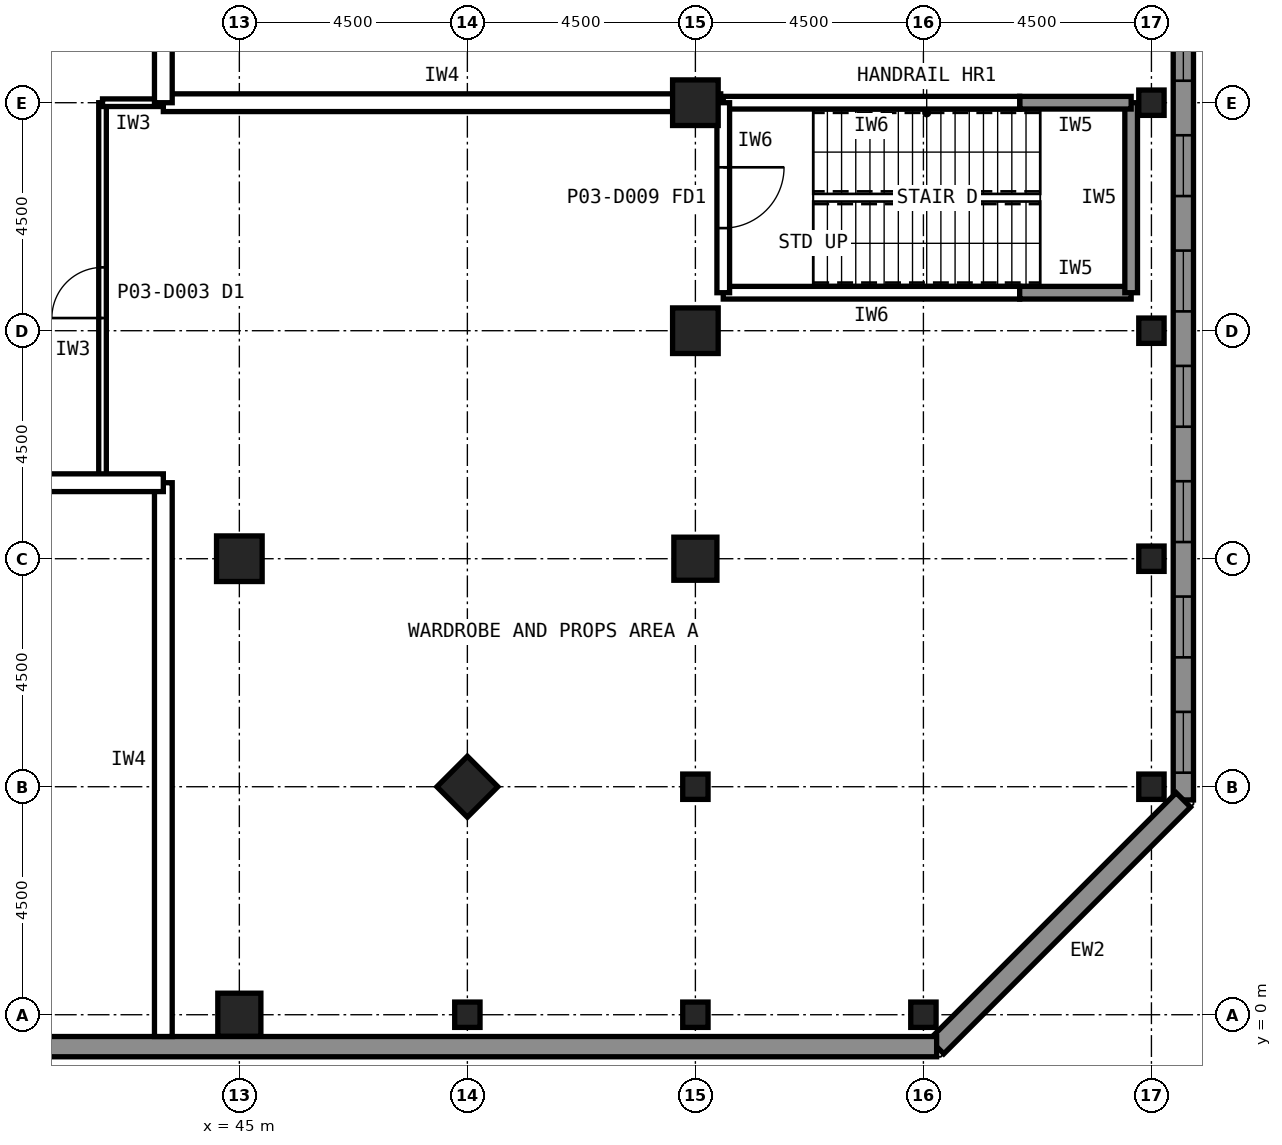
"""IFC4 building model, lengths in metres.
Left out: names, types, materials, properties, quantities, classifications, styles, units other than length and angle.
Written with IfcOpenShell. Run it as: python <this file> out.ifc"""

import sys

from ifc_helpers import new_model, si_unit, direction, frame, frame_2d, origin, origin_2d, place, context, subcontext, project, spatial, rectangle, hollow_rectangle, extrude, element, fill, save


model = new_model("IFC4")
c1 = context("Model", 3, precision=1e-05, world=origin(), true_north=direction((0.0, 1.0)))
c2 = subcontext(c1, "Body", "Model", "MODEL_VIEW")
j1 = project(units=[si_unit("LENGTHUNIT", "METRE"), si_unit("PLANEANGLEUNIT", "RADIAN")], contexts=[c1])
p1 = place(None, origin())
s1 = spatial("IfcSite", under=j1, at=p1, CompositionType="ELEMENT")
p2 = place(p1, origin())
s2 = spatial("IfcBuilding", under=s1, at=p2, CompositionType="ELEMENT")
p3 = place(p2, frame((0.0, 0.0, 12.0)))
s3 = spatial("IfcBuildingStorey", under=s2, at=p3, CompositionType="ELEMENT", Elevation=12.0)
for number, where, z_axis, x_axis in (
    (1, (45.0, 0.0, 0.0), (0.0, 0.0, 1.0), (1.0, 0.0, 0.0)),
    (2, (54.0, 9.0, 0.0), (0.0, 0.0, 1.0), (1.0, 0.0, 0.0)),
):
    element("IfcColumn", number, at=place(p3, frame(where, z_axis=z_axis, x_axis=x_axis)), inside=s3, PredefinedType="COLUMN", context=c2, shape_type="SweptSolid", body=[
        extrude(hollow_rectangle(XDim=0.85, YDim=0.85, WallThickness=0.05, at=origin_2d()), origin(), (0.0, 0.0, 1.0), 6.0),
    ])
for number, where, z_axis, x_axis in (
    (3, (54.0, 13.5, 0.0), (0.0, 0.0, 1.0), (1.0, 0.0, 0.0)),
    (4, (54.0, 18.0, 0.0), (0.0, 0.0, 1.0), (1.0, 0.0, 0.0)),
):
    element("IfcColumn", number, at=place(p3, frame(where, z_axis=z_axis, x_axis=x_axis)), inside=s3, PredefinedType="COLUMN", context=c2, shape_type="SweptSolid", body=[
        extrude(hollow_rectangle(XDim=0.9, YDim=0.9, WallThickness=0.063, at=origin_2d()), origin(), (0.0, 0.0, 1.0), 6.0),
    ])
p4 = place(p3, frame((49.5, 4.5, 0.0), z_axis=(0.0, 0.0, 1.0), x_axis=(0.707106781187, 0.707106781187, 0.0)))
e5 = element("IfcColumn", 5, at=p4, inside=s3, PredefinedType="COLUMN", context=c2, shape_type="SweptSolid", body=[
    extrude(hollow_rectangle(XDim=0.85, YDim=0.85, WallThickness=0.05, at=origin_2d()), origin(), (0.0, 0.0, 1.0), 6.0),
])
p5 = place(p3, frame((45.0, 9.0, 0.0), z_axis=(0.0, 0.0, 1.0), x_axis=(1.0, 0.0, 0.0)))
e6 = element("IfcColumn", 6, at=p5, inside=s3, PredefinedType="COLUMN", context=c2, shape_type="SweptSolid", body=[
    extrude(hollow_rectangle(XDim=0.9, YDim=0.9, WallThickness=0.063, at=origin_2d()), origin(), (0.0, 0.0, 1.0), 6.0),
])
for number, where, z_axis, x_axis in (
    (7, (63.0, 4.5, 0.0), (0.0, 0.0, 1.0), (1.0, 0.0, 0.0)),
    (8, (63.0, 9.0, 0.0), (0.0, 0.0, 1.0), (1.0, 0.0, 0.0)),
    (9, (63.0, 13.5, 0.0), (0.0, 0.0, 1.0), (1.0, 0.0, 0.0)),
    (10, (63.0, 18.0, 0.0), (0.0, 0.0, 1.0), (1.0, 0.0, 0.0)),
    (11, (58.5, 0.0, 0.0), (0.0, 0.0, 1.0), (1.0, 0.0, 0.0)),
    (12, (54.0, 0.0, 0.0), (0.0, 0.0, 1.0), (1.0, 0.0, 0.0)),
    (13, (49.5, 0.0, 0.0), (0.0, 0.0, 1.0), (1.0, 0.0, 0.0)),
    (14, (54.0, 4.5, 0.0), (0.0, 0.0, 1.0), (1.0, 0.0, 0.0)),
):
    element("IfcColumn", number, at=place(p3, frame(where, z_axis=z_axis, x_axis=x_axis)), inside=s3, PredefinedType="COLUMN", context=c2, shape_type="SweptSolid", body=[
        extrude(hollow_rectangle(XDim=0.5, YDim=0.5, WallThickness=0.022, at=origin_2d()), origin(), (0.0, 0.0, 1.0), 6.0),
    ])
p6 = place(p3, frame((63.63, 49.761, 0.0), z_axis=(0.0, 0.0, 1.0), x_axis=(0.0, -1.0, 0.0)))
e15 = element("IfcWall", 15, at=p6, inside=s3, PredefinedType="SOLIDWALL", context=c2, shape_type="SweptSolid", body=[
    extrude(rectangle(XDim=45.522, YDim=0.4, at=frame_2d((22.761, 0.0))), origin(), (0.0, 0.0, 1.0), 6.0),
])
p7 = place(p6, frame((0.538, 0.0, 0.9)))
e16 = element("IfcOpeningElement", 16, at=p7, cuts=e15, PredefinedType="OPENING", context=c2, shape_type="SweptSolid", body=[
    extrude(rectangle(XDim=1.2, YDim=1.5, at=frame_2d((0.6, 0.75))), frame((0.0, 0.21, 0.0), z_axis=(0.0, -1.0, 0.0), x_axis=(1.0, 0.0, 0.0)), (0.0, 0.0, 1.0), 0.42),
])
p8 = place(p6, frame((2.814, 0.0, 0.9)))
e17 = element("IfcOpeningElement", 17, at=p8, cuts=e15, PredefinedType="OPENING", context=c2, shape_type="SweptSolid", body=[
    extrude(rectangle(XDim=1.2, YDim=1.5, at=frame_2d((0.6, 0.75))), frame((0.0, 0.21, 0.0), z_axis=(0.0, -1.0, 0.0), x_axis=(1.0, 0.0, 0.0)), (0.0, 0.0, 1.0), 0.42),
])
p9 = place(p6, frame((5.09, 0.0, 0.9)))
e18 = element("IfcOpeningElement", 18, at=p9, cuts=e15, PredefinedType="OPENING", context=c2, shape_type="SweptSolid", body=[
    extrude(rectangle(XDim=1.2, YDim=1.5, at=frame_2d((0.6, 0.75))), frame((0.0, 0.21, 0.0), z_axis=(0.0, -1.0, 0.0), x_axis=(1.0, 0.0, 0.0)), (0.0, 0.0, 1.0), 0.42),
])
p10 = place(p6, frame((7.366, 0.0, 0.9)))
e19 = element("IfcOpeningElement", 19, at=p10, cuts=e15, PredefinedType="OPENING", context=c2, shape_type="SweptSolid", body=[
    extrude(rectangle(XDim=1.2, YDim=1.5, at=frame_2d((0.6, 0.75))), frame((0.0, 0.21, 0.0), z_axis=(0.0, -1.0, 0.0), x_axis=(1.0, 0.0, 0.0)), (0.0, 0.0, 1.0), 0.42),
])
p11 = place(p6, frame((9.642, 0.0, 0.9)))
e20 = element("IfcOpeningElement", 20, at=p11, cuts=e15, PredefinedType="OPENING", context=c2, shape_type="SweptSolid", body=[
    extrude(rectangle(XDim=1.2, YDim=1.5, at=frame_2d((0.6, 0.75))), frame((0.0, 0.21, 0.0), z_axis=(0.0, -1.0, 0.0), x_axis=(1.0, 0.0, 0.0)), (0.0, 0.0, 1.0), 0.42),
])
p12 = place(p6, frame((11.918, 0.0, 0.9)))
e21 = element("IfcOpeningElement", 21, at=p12, cuts=e15, PredefinedType="OPENING", context=c2, shape_type="SweptSolid", body=[
    extrude(rectangle(XDim=1.2, YDim=1.5, at=frame_2d((0.6, 0.75))), frame((0.0, 0.21, 0.0), z_axis=(0.0, -1.0, 0.0), x_axis=(1.0, 0.0, 0.0)), (0.0, 0.0, 1.0), 0.42),
])
p13 = place(p6, frame((14.195, 0.0, 0.9)))
e22 = element("IfcOpeningElement", 22, at=p13, cuts=e15, PredefinedType="OPENING", context=c2, shape_type="SweptSolid", body=[
    extrude(rectangle(XDim=1.2, YDim=1.5, at=frame_2d((0.6, 0.75))), frame((0.0, 0.21, 0.0), z_axis=(0.0, -1.0, 0.0), x_axis=(1.0, 0.0, 0.0)), (0.0, 0.0, 1.0), 0.42),
])
p14 = place(p6, frame((16.471, 0.0, 0.9)))
e23 = element("IfcOpeningElement", 23, at=p14, cuts=e15, PredefinedType="OPENING", context=c2, shape_type="SweptSolid", body=[
    extrude(rectangle(XDim=1.2, YDim=1.5, at=frame_2d((0.6, 0.75))), frame((0.0, 0.21, 0.0), z_axis=(0.0, -1.0, 0.0), x_axis=(1.0, 0.0, 0.0)), (0.0, 0.0, 1.0), 0.42),
])
p15 = place(p6, frame((18.747, 0.0, 0.9)))
e24 = element("IfcOpeningElement", 24, at=p15, cuts=e15, PredefinedType="OPENING", context=c2, shape_type="SweptSolid", body=[
    extrude(rectangle(XDim=1.2, YDim=1.5, at=frame_2d((0.6, 0.75))), frame((0.0, 0.21, 0.0), z_axis=(0.0, -1.0, 0.0), x_axis=(1.0, 0.0, 0.0)), (0.0, 0.0, 1.0), 0.42),
])
p16 = place(p6, frame((21.023, 0.0, 0.9)))
e25 = element("IfcOpeningElement", 25, at=p16, cuts=e15, PredefinedType="OPENING", context=c2, shape_type="SweptSolid", body=[
    extrude(rectangle(XDim=1.2, YDim=1.5, at=frame_2d((0.6, 0.75))), frame((0.0, 0.21, 0.0), z_axis=(0.0, -1.0, 0.0), x_axis=(1.0, 0.0, 0.0)), (0.0, 0.0, 1.0), 0.42),
])
p17 = place(p6, frame((23.299, 0.0, 0.9)))
e26 = element("IfcOpeningElement", 26, at=p17, cuts=e15, PredefinedType="OPENING", context=c2, shape_type="SweptSolid", body=[
    extrude(rectangle(XDim=1.2, YDim=1.5, at=frame_2d((0.6, 0.75))), frame((0.0, 0.21, 0.0), z_axis=(0.0, -1.0, 0.0), x_axis=(1.0, 0.0, 0.0)), (0.0, 0.0, 1.0), 0.42),
])
p18 = place(p6, frame((25.575, 0.0, 0.9)))
e27 = element("IfcOpeningElement", 27, at=p18, cuts=e15, PredefinedType="OPENING", context=c2, shape_type="SweptSolid", body=[
    extrude(rectangle(XDim=1.2, YDim=1.5, at=frame_2d((0.6, 0.75))), frame((0.0, 0.21, 0.0), z_axis=(0.0, -1.0, 0.0), x_axis=(1.0, 0.0, 0.0)), (0.0, 0.0, 1.0), 0.42),
])
p19 = place(p6, frame((27.851, 0.0, 0.9)))
e28 = element("IfcOpeningElement", 28, at=p19, cuts=e15, PredefinedType="OPENING", context=c2, shape_type="SweptSolid", body=[
    extrude(rectangle(XDim=1.2, YDim=1.5, at=frame_2d((0.6, 0.75))), frame((0.0, 0.21, 0.0), z_axis=(0.0, -1.0, 0.0), x_axis=(1.0, 0.0, 0.0)), (0.0, 0.0, 1.0), 0.42),
])
p20 = place(p6, frame((30.127, 0.0, 0.9)))
e29 = element("IfcOpeningElement", 29, at=p20, cuts=e15, PredefinedType="OPENING", context=c2, shape_type="SweptSolid", body=[
    extrude(rectangle(XDim=1.2, YDim=1.5, at=frame_2d((0.6, 0.75))), frame((0.0, 0.21, 0.0), z_axis=(0.0, -1.0, 0.0), x_axis=(1.0, 0.0, 0.0)), (0.0, 0.0, 1.0), 0.42),
])
p21 = place(p6, frame((32.404, 0.0, 0.9)))
e30 = element("IfcOpeningElement", 30, at=p21, cuts=e15, PredefinedType="OPENING", context=c2, shape_type="SweptSolid", body=[
    extrude(rectangle(XDim=1.2, YDim=1.5, at=frame_2d((0.6, 0.75))), frame((0.0, 0.21, 0.0), z_axis=(0.0, -1.0, 0.0), x_axis=(1.0, 0.0, 0.0)), (0.0, 0.0, 1.0), 0.42),
])
p22 = place(p6, frame((34.679, 0.0, 0.9)))
e31 = element("IfcOpeningElement", 31, at=p22, cuts=e15, PredefinedType="OPENING", context=c2, shape_type="SweptSolid", body=[
    extrude(rectangle(XDim=1.2, YDim=1.5, at=frame_2d((0.6, 0.75))), frame((0.0, 0.21, 0.0), z_axis=(0.0, -1.0, 0.0), x_axis=(1.0, 0.0, 0.0)), (0.0, 0.0, 1.0), 0.42),
])
p23 = place(p6, frame((36.956, 0.0, 0.9)))
e32 = element("IfcOpeningElement", 32, at=p23, cuts=e15, PredefinedType="OPENING", context=c2, shape_type="SweptSolid", body=[
    extrude(rectangle(XDim=1.2, YDim=1.5, at=frame_2d((0.6, 0.75))), frame((0.0, 0.21, 0.0), z_axis=(0.0, -1.0, 0.0), x_axis=(1.0, 0.0, 0.0)), (0.0, 0.0, 1.0), 0.42),
])
p24 = place(p6, frame((39.232, 0.0, 0.9)))
e33 = element("IfcOpeningElement", 33, at=p24, cuts=e15, PredefinedType="OPENING", context=c2, shape_type="SweptSolid", body=[
    extrude(rectangle(XDim=1.2, YDim=1.5, at=frame_2d((0.6, 0.75))), frame((0.0, 0.21, 0.0), z_axis=(0.0, -1.0, 0.0), x_axis=(1.0, 0.0, 0.0)), (0.0, 0.0, 1.0), 0.42),
])
p25 = place(p6, frame((41.508, 0.0, 0.9)))
e34 = element("IfcOpeningElement", 34, at=p25, cuts=e15, PredefinedType="OPENING", context=c2, shape_type="SweptSolid", body=[
    extrude(rectangle(XDim=1.2, YDim=1.5, at=frame_2d((0.6, 0.75))), frame((0.0, 0.21, 0.0), z_axis=(0.0, -1.0, 0.0), x_axis=(1.0, 0.0, 0.0)), (0.0, 0.0, 1.0), 0.42),
])
p26 = place(p6, frame((43.784, 0.0, 0.9)))
e35 = element("IfcOpeningElement", 35, at=p26, cuts=e15, PredefinedType="OPENING", context=c2, shape_type="SweptSolid", body=[
    extrude(rectangle(XDim=1.2, YDim=1.5, at=frame_2d((0.6, 0.75))), frame((0.0, 0.21, 0.0), z_axis=(0.0, -1.0, 0.0), x_axis=(1.0, 0.0, 0.0)), (0.0, 0.0, 1.0), 0.42),
])
p27 = place(p3, frame((63.63, 4.239, 0.0), z_axis=(0.0, 0.0, 1.0), x_axis=(-0.707106781187, -0.707106781187, 0.0)))
e36 = element("IfcWall", 36, at=p27, inside=s3, PredefinedType="SOLIDWALL", context=c2, shape_type="SweptSolid", body=[
    extrude(rectangle(XDim=6.886, YDim=0.4, at=frame_2d((3.443, 0.0))), origin(), (0.0, 0.0, 1.0), 6.0),
])
p28 = place(p3, frame((58.761, -0.63, 0.0), z_axis=(0.0, 0.0, 1.0), x_axis=(-1.0, 0.0, 0.0)))
e37 = element("IfcWall", 37, at=p28, inside=s3, PredefinedType="SOLIDWALL", context=c2, shape_type="SweptSolid", body=[
    extrude(rectangle(XDim=63.522, YDim=0.4, at=frame_2d((31.761, 0.0))), origin(), (0.0, 0.0, 1.0), 6.0),
])
p29 = place(p3, frame((42.3, 10.5, 0.0), z_axis=(0.0, 0.0, 1.0), x_axis=(0.0, 1.0, 0.0)))
e38 = element("IfcWall", 38, at=p29, inside=s3, PredefinedType="PARTITIONING", context=c2, shape_type="SweptSolid", body=[
    extrude(rectangle(XDim=7.5, YDim=0.15, at=frame_2d((3.75, 0.0))), origin(), (0.0, 0.0, 1.0), 5.8),
])
p30 = place(p29, frame((3.25, 0.0, 0.0)))
e39 = element("IfcOpeningElement", 39, at=p30, cuts=e38, PredefinedType="OPENING", context=c2, shape_type="SweptSolid", body=[
    extrude(rectangle(XDim=1.0, YDim=2.1, at=frame_2d((0.5, 1.05))), frame((0.0, 0.085, 0.0), z_axis=(0.0, -1.0, 0.0), x_axis=(1.0, 0.0, 0.0)), (0.0, 0.0, 1.0), 0.17),
])
p31 = place(p3, frame((42.3, 18.0, 0.0), z_axis=(0.0, 0.0, 1.0), x_axis=(1.0, 0.0, 0.0)))
e40 = element("IfcWall", 40, at=p31, inside=s3, PredefinedType="PARTITIONING", context=c2, shape_type="SweptSolid", body=[
    extrude(rectangle(XDim=1.21, YDim=0.15, at=frame_2d((0.605, 0.0))), origin(), (0.0, 0.0, 1.0), 4.949),
])
p32 = place(p3, frame((43.5, -0.43, 0.0), z_axis=(0.0, 0.0, 1.0), x_axis=(0.0, 1.0, 0.0)))
e41 = element("IfcWall", 41, at=p32, inside=s3, PredefinedType="PARTITIONING", context=c2, shape_type="SweptSolid", body=[
    extrude(rectangle(XDim=10.93, YDim=0.35, at=frame_2d((5.465, 0.0))), origin(), (0.0, 0.0, 1.0), 5.8),
])
p33 = place(p3, frame((43.5, 10.5, 0.0), z_axis=(0.0, 0.0, 1.0), x_axis=(-1.0, 0.0, 0.0)))
e42 = element("IfcWall", 42, at=p33, inside=s3, PredefinedType="PARTITIONING", context=c2, shape_type="SweptSolid", body=[
    extrude(rectangle(XDim=33.0, YDim=0.35, at=frame_2d((16.5, 0.0))), origin(), (0.0, 0.0, 1.0), 5.8),
])
p34 = place(p33, frame((15.3, 0.0, 0.0)))
e43 = element("IfcOpeningElement", 43, at=p34, cuts=e42, PredefinedType="OPENING", context=c2, shape_type="SweptSolid", body=[
    extrude(rectangle(XDim=2.4, YDim=3.0, at=frame_2d((1.2, 1.5))), frame((0.0, 0.185, 0.0), z_axis=(0.0, -1.0, 0.0), x_axis=(1.0, 0.0, 0.0)), (0.0, 0.0, 1.0), 0.37),
])
p35 = place(p3, frame((43.5, 18.0, 0.0), z_axis=(0.0, 0.0, 1.0), x_axis=(1.0, 0.0, 0.0)))
e44 = element("IfcWall", 44, at=p35, inside=s3, PredefinedType="PARTITIONING", context=c2, shape_type="SweptSolid", body=[
    extrude(rectangle(XDim=11.0, YDim=0.35, at=frame_2d((5.5, 0.0))), origin(), (0.0, 0.0, 1.0), 4.949),
])
p36 = place(p3, frame((43.5, 36.0, 0.0), z_axis=(0.0, 0.0, 1.0), x_axis=(0.0, -1.0, 0.0)))
e45 = element("IfcWall", 45, at=p36, inside=s3, PredefinedType="PARTITIONING", context=c2, shape_type="SweptSolid", body=[
    extrude(rectangle(XDim=18.0, YDim=0.35, at=frame_2d((9.0, 0.0))), origin(), (0.0, 0.0, 1.0), 5.8),
])
p37 = place(p36, frame((7.8, 0.0, 0.0)))
e46 = element("IfcOpeningElement", 46, at=p37, cuts=e45, PredefinedType="OPENING", context=c2, shape_type="SweptSolid", body=[
    extrude(rectangle(XDim=2.4, YDim=3.0, at=frame_2d((1.2, 1.5))), frame((0.0, 0.185, 0.0), z_axis=(0.0, -1.0, 0.0), x_axis=(1.0, 0.0, 0.0)), (0.0, 0.0, 1.0), 0.37),
])
p38 = place(p3, frame((54.55, 14.25, 0.0), z_axis=(0.0, 0.0, 1.0), x_axis=(1.0, 0.0, 0.0)))
e47 = element("IfcWall", 47, at=p38, inside=s3, PredefinedType="PARTITIONING", context=c2, shape_type="SweptSolid", body=[
    extrude(rectangle(XDim=5.85, YDim=0.25, at=frame_2d((2.925, 0.0))), origin(), (0.0, 0.0, 1.0), 5.8),
])
p39 = place(p3, frame((60.4, 14.25, 0.0), z_axis=(0.0, 0.0, 1.0), x_axis=(1.0, 0.0, 0.0)))
e48 = element("IfcWall", 48, at=p39, inside=s3, PredefinedType="SOLIDWALL", context=c2, shape_type="SweptSolid", body=[
    extrude(rectangle(XDim=2.2, YDim=0.25, at=frame_2d((1.1, 0.0))), origin(), (0.0, 0.0, 1.0), 6.0),
])
p40 = place(p3, frame((62.6, 14.25, 0.0), z_axis=(0.0, 0.0, 1.0), x_axis=(0.0, 1.0, 0.0)))
e49 = element("IfcWall", 49, at=p40, inside=s3, PredefinedType="SOLIDWALL", context=c2, shape_type="SweptSolid", body=[
    extrude(rectangle(XDim=3.75, YDim=0.25, at=frame_2d((1.875, 0.0))), origin(), (0.0, 0.0, 1.0), 6.0),
])
p41 = place(p3, frame((62.6, 18.0, 0.0), z_axis=(0.0, 0.0, 1.0), x_axis=(-1.0, 0.0, 0.0)))
e50 = element("IfcWall", 50, at=p41, inside=s3, PredefinedType="SOLIDWALL", context=c2, shape_type="SweptSolid", body=[
    extrude(rectangle(XDim=2.2, YDim=0.25, at=frame_2d((1.1, 0.0))), origin(), (0.0, 0.0, 1.0), 5.189),
])
p42 = place(p3, frame((60.4, 18.0, 0.0), z_axis=(0.0, 0.0, 1.0), x_axis=(-1.0, 0.0, 0.0)))
e51 = element("IfcWall", 51, at=p42, inside=s3, PredefinedType="PARTITIONING", context=c2, shape_type="SweptSolid", body=[
    extrude(rectangle(XDim=5.85, YDim=0.25, at=frame_2d((2.925, 0.0))), origin(), (0.0, 0.0, 1.0), 5.189),
])
p43 = place(p3, frame((54.55, 18.0, 0.0), z_axis=(0.0, 0.0, 1.0), x_axis=(0.0, -1.0, 0.0)))
e52 = element("IfcWall", 52, at=p43, inside=s3, PredefinedType="PARTITIONING", context=c2, shape_type="SweptSolid", body=[
    extrude(rectangle(XDim=3.75, YDim=0.25, at=frame_2d((1.875, 0.0))), origin(), (0.0, 0.0, 1.0), 5.8),
])
p44 = place(p43, frame((1.275, 0.0, 0.0)))
e53 = element("IfcOpeningElement", 53, at=p44, cuts=e52, PredefinedType="OPENING", context=c2, shape_type="SweptSolid", body=[
    extrude(rectangle(XDim=1.2, YDim=2.1, at=frame_2d((0.6, 1.05))), frame((0.0, 0.135, 0.0), z_axis=(0.0, -1.0, 0.0), x_axis=(1.0, 0.0, 0.0)), (0.0, 0.0, 1.0), 0.27),
])
p45 = place(p20, origin())
e54 = element("IfcWindow", 54, at=p45, inside=s3, PartitioningType="SINGLE_PANEL", PredefinedType="WINDOW", context=c2, shape_type="SweptSolid", body=[
    extrude(rectangle(XDim=1.2, YDim=1.5, at=frame_2d((0.6, 0.75))), frame((0.0, 0.03, 0.0), z_axis=(0.0, -1.0, 0.0), x_axis=(1.0, 0.0, 0.0)), (0.0, 0.0, 1.0), 0.06),
])
fill(e29, e54)
p46 = place(p21, origin())
e55 = element("IfcWindow", 55, at=p46, inside=s3, PartitioningType="SINGLE_PANEL", PredefinedType="WINDOW", context=c2, shape_type="SweptSolid", body=[
    extrude(rectangle(XDim=1.2, YDim=1.5, at=frame_2d((0.6, 0.75))), frame((0.0, 0.03, 0.0), z_axis=(0.0, -1.0, 0.0), x_axis=(1.0, 0.0, 0.0)), (0.0, 0.0, 1.0), 0.06),
])
fill(e30, e55)
p47 = place(p22, origin())
e56 = element("IfcWindow", 56, at=p47, inside=s3, PartitioningType="SINGLE_PANEL", PredefinedType="WINDOW", context=c2, shape_type="SweptSolid", body=[
    extrude(rectangle(XDim=1.2, YDim=1.5, at=frame_2d((0.6, 0.75))), frame((0.0, 0.03, 0.0), z_axis=(0.0, -1.0, 0.0), x_axis=(1.0, 0.0, 0.0)), (0.0, 0.0, 1.0), 0.06),
])
fill(e31, e56)
p48 = place(p23, origin())
e57 = element("IfcWindow", 57, at=p48, inside=s3, PartitioningType="SINGLE_PANEL", PredefinedType="WINDOW", context=c2, shape_type="SweptSolid", body=[
    extrude(rectangle(XDim=1.2, YDim=1.5, at=frame_2d((0.6, 0.75))), frame((0.0, 0.03, 0.0), z_axis=(0.0, -1.0, 0.0), x_axis=(1.0, 0.0, 0.0)), (0.0, 0.0, 1.0), 0.06),
])
fill(e32, e57)
p49 = place(p24, origin())
e58 = element("IfcWindow", 58, at=p49, inside=s3, PartitioningType="SINGLE_PANEL", PredefinedType="WINDOW", context=c2, shape_type="SweptSolid", body=[
    extrude(rectangle(XDim=1.2, YDim=1.5, at=frame_2d((0.6, 0.75))), frame((0.0, 0.03, 0.0), z_axis=(0.0, -1.0, 0.0), x_axis=(1.0, 0.0, 0.0)), (0.0, 0.0, 1.0), 0.06),
])
fill(e33, e58)
p50 = place(p25, origin())
e59 = element("IfcWindow", 59, at=p50, inside=s3, PartitioningType="SINGLE_PANEL", PredefinedType="WINDOW", context=c2, shape_type="SweptSolid", body=[
    extrude(rectangle(XDim=1.2, YDim=1.5, at=frame_2d((0.6, 0.75))), frame((0.0, 0.03, 0.0), z_axis=(0.0, -1.0, 0.0), x_axis=(1.0, 0.0, 0.0)), (0.0, 0.0, 1.0), 0.06),
])
fill(e34, e59)
p51 = place(p26, origin())
e60 = element("IfcWindow", 60, at=p51, inside=s3, PartitioningType="SINGLE_PANEL", PredefinedType="WINDOW", context=c2, shape_type="SweptSolid", body=[
    extrude(rectangle(XDim=1.2, YDim=1.5, at=frame_2d((0.6, 0.75))), frame((0.0, 0.03, 0.0), z_axis=(0.0, -1.0, 0.0), x_axis=(1.0, 0.0, 0.0)), (0.0, 0.0, 1.0), 0.06),
])
fill(e35, e60)
p52 = place(p30, origin())
e61 = element("IfcDoor", 61, at=p52, inside=s3, OperationType="SINGLE_SWING_LEFT", PredefinedType="DOOR", context=c2, shape_type="SweptSolid", body=[
    extrude(rectangle(XDim=1.0, YDim=2.1, at=frame_2d((0.5, 1.05))), frame((0.0, 0.025, 0.0), z_axis=(0.0, -1.0, 0.0), x_axis=(1.0, 0.0, 0.0)), (0.0, 0.0, 1.0), 0.05),
])
fill(e39, e61)
p53 = place(p44, origin())
e62 = element("IfcDoor", 62, at=p53, inside=s3, OperationType="SINGLE_SWING_LEFT", PredefinedType="DOOR", context=c2, shape_type="SweptSolid", body=[
    extrude(rectangle(XDim=1.2, YDim=2.1, at=frame_2d((0.6, 1.05))), frame((0.0, 0.025, 0.0), z_axis=(0.0, -1.0, 0.0), x_axis=(1.0, 0.0, 0.0)), (0.0, 0.0, 1.0), 0.05),
])
fill(e53, e62)
save(model, sys.argv[1])
